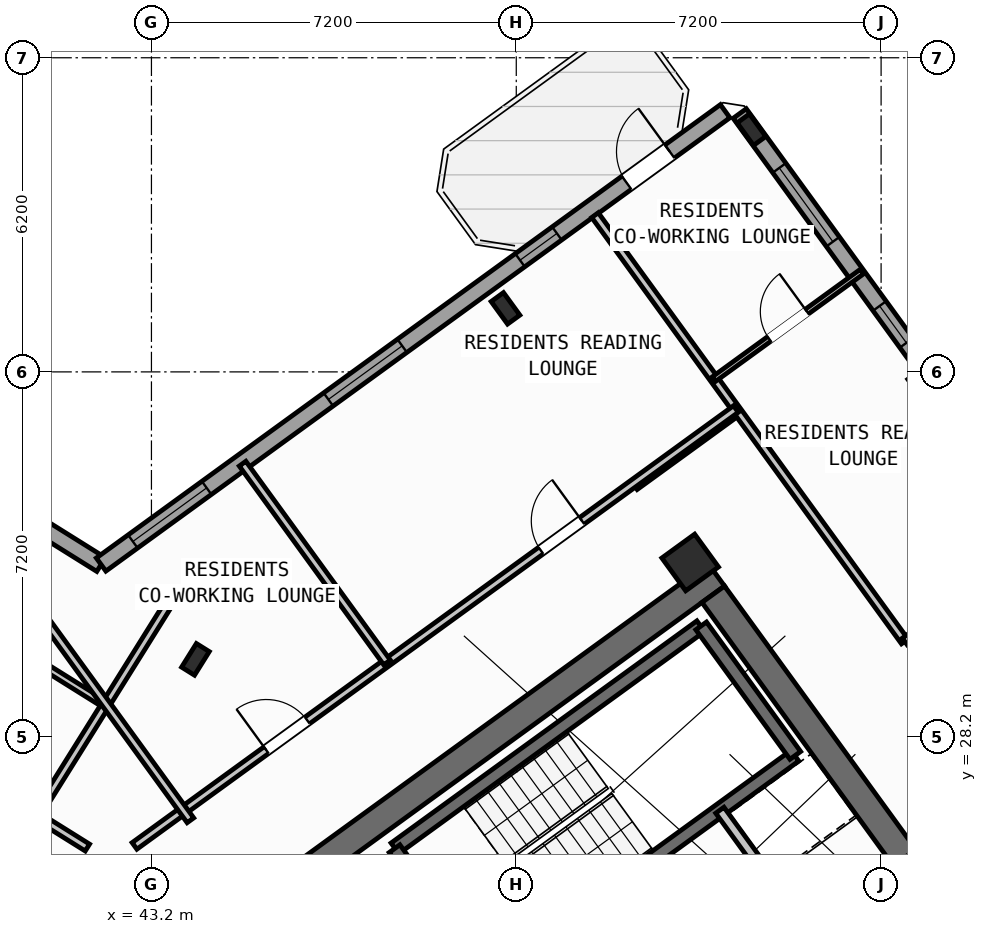
"""IFC4 building model, lengths in metres.
Left out: names, types, materials, properties, quantities, classifications, styles, units other than length and angle.
Written with IfcOpenShell. Run it as: python <this file> out.ifc"""

import sys

from ifc_helpers import new_model, si_unit, direction, frame, frame_2d, origin, origin_2d, place, context, subcontext, project, spatial, rectangle, hollow_rectangle, i_section, extrude, source, transform, mapped, element, fill, save


model = new_model("IFC4")
c1 = context("Model", 3, precision=1e-05, world=origin(), true_north=direction((0.0, 1.0)))
c2 = subcontext(c1, "Body", "Model", "MODEL_VIEW")
j1 = project(units=[si_unit("LENGTHUNIT", "METRE"), si_unit("PLANEANGLEUNIT", "RADIAN")], contexts=[c1])
p1 = place(None, origin())
s1 = spatial("IfcSite", under=j1, at=p1, CompositionType="ELEMENT")
p2 = place(p1, origin())
s2 = spatial("IfcBuilding", under=s1, at=p2, CompositionType="ELEMENT")
p3 = place(p2, frame((0.0, 0.0, 184.2)))
s3 = spatial("IfcBuildingStorey", under=s2, at=p3, CompositionType="ELEMENT", Elevation=184.2)
p4 = place(p3, frame((44.365, 24.142, 0.0), z_axis=(0.0, 0.0, 1.0), x_axis=(0.809024304885, 0.587775190107, 0.0)))
e1 = element("IfcWall", 1, at=p4, inside=s3, PredefinedType="SHEAR", context=c2, shape_type="SweptSolid", body=[
    extrude(rectangle(XDim=12.34, YDim=0.55, at=frame_2d((6.17, 0.0))), origin(), (0.0, 0.0, 1.0), 3.35),
])
p5 = place(p3, frame((58.064, 25.813, 0.0), z_axis=(0.0, 0.0, 1.0), x_axis=(-0.587764933797, 0.809031756236, 0.0)))
e2 = element("IfcWall", 2, at=p5, inside=s3, PredefinedType="SHEAR", context=c2, shape_type="SweptSolid", body=[
    extrude(rectangle(XDim=6.425, YDim=0.55, at=frame_2d((3.212, 0.0))), origin(), (0.0, 0.0, 1.0), 3.35),
])
m1 = source(origin(), c2, "Body", "SweptSolid", [
    extrude(i_section(OverallWidth=0.3, OverallDepth=0.55, WebThickness=0.015, FlangeThickness=0.029, at=origin_2d()), origin(), (0.0, 0.0, 1.0), 3.6),
])
p6 = place(p3, frame((44.068, 29.726, 0.0), z_axis=(0.0, 0.0, 1.0), x_axis=(-0.848048096156, 0.529919264233, 0.0)))
e3 = element("IfcColumn", 3, at=p6, inside=s3, PredefinedType="COLUMN", context=c2, shape_type="MappedRepresentation", body=[
    mapped(m1, transform((0.0, 0.0, 0.0), scale=1.0)),
])
m2 = source(origin(), c2, "Body", "SweptSolid", [
    extrude(hollow_rectangle(XDim=0.8, YDim=0.8, WallThickness=0.032, at=origin_2d()), origin(), (0.0, 0.0, 1.0), 3.6),
])
p7 = place(p3, frame((53.832, 31.638, 0.0), z_axis=(0.0, 0.0, 1.0), x_axis=(0.809016994375, 0.587785252292, 0.0)))
e4 = element("IfcColumn", 4, at=p7, inside=s3, PredefinedType="COLUMN", context=c2, shape_type="MappedRepresentation", body=[
    mapped(m2, transform((0.0, 0.0, 0.0), scale=1.0)),
])
for number, where, z_axis, x_axis in (
    (5, (50.188, 36.654, 0.0), (0.0, 0.0, 1.0), (0.809, 0.588, 0.0)),
    (6, (55.042, 40.181, 0.0), (0.0, 0.0, 1.0), (0.809, 0.588, 0.0)),
):
    element("IfcColumn", number, at=place(p3, frame(where, z_axis=z_axis, x_axis=x_axis)), inside=s3, PredefinedType="COLUMN", context=c2, shape_type="MappedRepresentation", body=[
        mapped(m1, transform((0.0, 0.0, 0.0), scale=1.0)),
    ])
p8 = place(p3, frame((17.424, 47.083, 0.0), z_axis=(0.0, 0.0, 1.0), x_axis=(0.848049927979, -0.529916332693, 0.0)))
e7 = element("IfcWall", 7, at=p8, inside=s3, PredefinedType="STANDARD", context=c2, shape_type="SweptSolid", body=[
    extrude(rectangle(XDim=29.223, YDim=0.32, at=frame_2d((14.612, 0.0))), origin(), (0.0, 0.0, 1.0), 3.35),
])
p9 = place(p8, frame((3.764, 0.0, 0.0)))
e8 = element("IfcOpeningElement", 8, at=p9, cuts=e7, PredefinedType="OPENING", context=c2, shape_type="SweptSolid", body=[
    extrude(rectangle(XDim=1.05, YDim=2.15, at=frame_2d((0.525, 1.075))), frame((0.0, 0.17, 0.0), z_axis=(0.0, -1.0, 0.0), x_axis=(1.0, 0.0, 0.0)), (0.0, 0.0, 1.0), 0.34),
])
p10 = place(p8, frame((8.344, 0.0, 0.8)))
e9 = element("IfcOpeningElement", 9, at=p10, cuts=e7, PredefinedType="OPENING", context=c2, shape_type="SweptSolid", body=[
    extrude(rectangle(XDim=2.1, YDim=1.55, at=frame_2d((1.05, 0.775))), frame((0.0, 0.17, 0.0), z_axis=(0.0, -1.0, 0.0), x_axis=(1.0, 0.0, 0.0)), (0.0, 0.0, 1.0), 0.34),
])
p11 = place(p8, frame((13.589, 0.0, 0.85)))
e10 = element("IfcOpeningElement", 10, at=p11, cuts=e7, PredefinedType="OPENING", context=c2, shape_type="SweptSolid", body=[
    extrude(rectangle(XDim=1.8, YDim=1.5, at=frame_2d((0.9, 0.75))), frame((0.0, 0.17, 0.0), z_axis=(0.0, -1.0, 0.0), x_axis=(1.0, 0.0, 0.0)), (0.0, 0.0, 1.0), 0.34),
])
p12 = place(p8, frame((17.104, 0.0, 0.95)))
e11 = element("IfcOpeningElement", 11, at=p12, cuts=e7, PredefinedType="OPENING", context=c2, shape_type="SweptSolid", body=[
    extrude(rectangle(XDim=1.2, YDim=1.4, at=frame_2d((0.6, 0.7))), frame((0.0, 0.17, 0.0), z_axis=(0.0, -1.0, 0.0), x_axis=(1.0, 0.0, 0.0)), (0.0, 0.0, 1.0), 0.34),
])
p13 = place(p8, frame((21.214, 0.0, 0.95)))
e12 = element("IfcOpeningElement", 12, at=p13, cuts=e7, PredefinedType="OPENING", context=c2, shape_type="SweptSolid", body=[
    extrude(rectangle(XDim=1.2, YDim=1.4, at=frame_2d((0.6, 0.7))), frame((0.0, 0.17, 0.0), z_axis=(0.0, -1.0, 0.0), x_axis=(1.0, 0.0, 0.0)), (0.0, 0.0, 1.0), 0.34),
])
p14 = place(p8, frame((25.853, 0.0, 0.95)))
e13 = element("IfcOpeningElement", 13, at=p14, cuts=e7, PredefinedType="OPENING", context=c2, shape_type="SweptSolid", body=[
    extrude(rectangle(XDim=1.2, YDim=1.4, at=frame_2d((0.6, 0.7))), frame((0.0, 0.17, 0.0), z_axis=(0.0, -1.0, 0.0), x_axis=(1.0, 0.0, 0.0)), (0.0, 0.0, 1.0), 0.34),
])
p15 = place(p3, frame((42.207, 31.597, 0.0), z_axis=(0.0, 0.0, 1.0), x_axis=(0.809020333377, 0.587780656523, 0.0)))
e14 = element("IfcWall", 14, at=p15, inside=s3, PredefinedType="STANDARD", context=c2, shape_type="SweptSolid", body=[
    extrude(rectangle(XDim=15.223, YDim=0.32, at=frame_2d((7.611, 0.0))), origin(), (0.0, 0.0, 1.0), 3.35),
])
p16 = place(p15, frame((12.82, 0.0, 0.0)))
e15 = element("IfcOpeningElement", 15, at=p16, cuts=e14, PredefinedType="OPENING", context=c2, shape_type="SweptSolid", body=[
    extrude(rectangle(XDim=1.05, YDim=2.15, at=frame_2d((0.525, 1.075))), frame((0.0, 0.17, 0.0), z_axis=(0.0, -1.0, 0.0), x_axis=(1.0, 0.0, 0.0)), (0.0, 0.0, 1.0), 0.34),
])
p17 = place(p15, frame((0.775, 0.0, 0.85)))
e16 = element("IfcOpeningElement", 16, at=p17, cuts=e14, PredefinedType="OPENING", context=c2, shape_type="SweptSolid", body=[
    extrude(rectangle(XDim=1.8, YDim=1.5, at=frame_2d((0.9, 0.75))), frame((0.0, 0.17, 0.0), z_axis=(0.0, -1.0, 0.0), x_axis=(1.0, 0.0, 0.0)), (0.0, 0.0, 1.0), 0.34),
])
p18 = place(p15, frame((5.544, 0.0, 0.85)))
e17 = element("IfcOpeningElement", 17, at=p18, cuts=e14, PredefinedType="OPENING", context=c2, shape_type="SweptSolid", body=[
    extrude(rectangle(XDim=1.8, YDim=1.5, at=frame_2d((0.9, 0.75))), frame((0.0, 0.17, 0.0), z_axis=(0.0, -1.0, 0.0), x_axis=(1.0, 0.0, 0.0)), (0.0, 0.0, 1.0), 0.34),
])
p19 = place(p15, frame((10.219, 0.0, 1.0)))
e18 = element("IfcOpeningElement", 18, at=p19, cuts=e14, PredefinedType="OPENING", context=c2, shape_type="SweptSolid", body=[
    extrude(rectangle(XDim=0.9, YDim=1.25, at=frame_2d((0.45, 0.625))), frame((0.0, 0.17, 0.0), z_axis=(0.0, -1.0, 0.0), x_axis=(1.0, 0.0, 0.0)), (0.0, 0.0, 1.0), 0.34),
])
p20 = place(p3, frame((54.81, 40.5, 0.0), z_axis=(0.0, 0.0, 1.0), x_axis=(0.587783625747, -0.809018176127, 0.0)))
e19 = element("IfcWall", 19, at=p20, inside=s3, PredefinedType="STANDARD", context=c2, shape_type="SweptSolid", body=[
    extrude(rectangle(XDim=21.587, YDim=0.32, at=frame_2d((10.794, 0.0))), origin(), (0.0, 0.0, 1.0), 2.825),
])
p21 = place(p20, frame((1.328, 0.0, 0.85)))
e20 = element("IfcOpeningElement", 20, at=p21, cuts=e19, PredefinedType="OPENING", context=c2, shape_type="SweptSolid", body=[
    extrude(rectangle(XDim=1.8, YDim=1.5, at=frame_2d((0.9, 0.75))), frame((0.0, 0.17, 0.0), z_axis=(0.0, -1.0, 0.0), x_axis=(1.0, 0.0, 0.0)), (0.0, 0.0, 1.0), 0.34),
])
p22 = place(p20, frame((4.695, 0.0, 1.0)))
e21 = element("IfcOpeningElement", 21, at=p22, cuts=e19, PredefinedType="OPENING", context=c2, shape_type="SweptSolid", body=[
    extrude(rectangle(XDim=0.9, YDim=1.25, at=frame_2d((0.45, 0.625))), frame((0.0, 0.17, 0.0), z_axis=(0.0, -1.0, 0.0), x_axis=(1.0, 0.0, 0.0)), (0.0, 0.0, 1.0), 0.34),
])
p23 = place(p20, frame((7.829, 0.0, 0.85)))
e22 = element("IfcOpeningElement", 22, at=p23, cuts=e19, PredefinedType="OPENING", context=c2, shape_type="SweptSolid", body=[
    extrude(rectangle(XDim=1.5, YDim=1.5, at=frame_2d((0.75, 0.75))), frame((0.0, 0.17, 0.0), z_axis=(0.0, -1.0, 0.0), x_axis=(1.0, 0.0, 0.0)), (0.0, 0.0, 1.0), 0.34),
])
p24 = place(p20, frame((15.542, 0.0, 0.95)))
e23 = element("IfcOpeningElement", 23, at=p24, cuts=e19, PredefinedType="OPENING", context=c2, shape_type="SweptSolid", body=[
    extrude(rectangle(XDim=1.2, YDim=1.4, at=frame_2d((0.6, 0.7))), frame((0.0, 0.17, 0.0), z_axis=(0.0, -1.0, 0.0), x_axis=(1.0, 0.0, 0.0)), (0.0, 0.0, 1.0), 0.34),
])
p25 = place(p20, frame((19.097, 0.0, 1.0)))
e24 = element("IfcOpeningElement", 24, at=p25, cuts=e19, PredefinedType="OPENING", context=c2, shape_type="SweptSolid", body=[
    extrude(rectangle(XDim=0.9, YDim=1.25, at=frame_2d((0.45, 0.625))), frame((0.0, 0.17, 0.0), z_axis=(0.0, -1.0, 0.0), x_axis=(1.0, 0.0, 0.0)), (0.0, 0.0, 1.0), 0.34),
])
p26 = place(p3, frame((48.006, 25.996, 0.0), z_axis=(0.0, 0.0, 1.0), x_axis=(0.80901903764, 0.587782439969, 0.0)))
e25 = element("IfcWall", 25, at=p26, inside=s3, PredefinedType="SHEAR", context=c2, shape_type="SweptSolid", body=[
    extrude(rectangle(XDim=7.46, YDim=0.26, at=frame_2d((3.73, 0.0))), origin(), (0.0, 0.0, 1.0), 3.35),
])
p27 = place(p3, frame((49.863, 23.44, 0.0), z_axis=(0.0, 0.0, 1.0), x_axis=(0.809003474932, 0.587803859759, 0.0)))
e26 = element("IfcWall", 26, at=p27, inside=s3, PredefinedType="SHEAR", context=c2, shape_type="SweptSolid", body=[
    extrude(rectangle(XDim=7.46, YDim=0.26, at=frame_2d((3.73, 0.0))), origin(), (0.0, 0.0, 1.0), 3.35),
])
p28 = place(p27, frame((0.36, 0.0, 0.0)))
e27 = element("IfcOpeningElement", 27, at=p28, cuts=e26, PredefinedType="OPENING", context=c2, shape_type="SweptSolid", body=[
    extrude(rectangle(XDim=0.86, YDim=2.05, at=frame_2d((0.43, 1.025))), frame((0.0, 0.14, 0.0), z_axis=(0.0, -1.0, 0.0), x_axis=(1.0, 0.0, 0.0)), (0.0, 0.0, 1.0), 0.28),
])
p29 = place(p3, frame((49.855, 23.434, 0.0), z_axis=(0.0, 0.0, 1.0), x_axis=(-0.58776738483, 0.809029975545, 0.0)))
e28 = element("IfcWall", 28, at=p29, inside=s3, PredefinedType="SHEAR", context=c2, shape_type="SweptSolid", body=[
    extrude(rectangle(XDim=3.16, YDim=0.26, at=frame_2d((1.58, 0.0))), origin(), (0.0, 0.0, 1.0), 3.35),
])
p30 = place(p3, frame((55.906, 27.831, 0.0), z_axis=(0.0, 0.0, 1.0), x_axis=(-0.587804123638, 0.809003283204, 0.0)))
e29 = element("IfcWall", 29, at=p30, inside=s3, PredefinedType="SHEAR", context=c2, shape_type="SweptSolid", body=[
    extrude(rectangle(XDim=3.16, YDim=0.26, at=frame_2d((1.58, 0.0))), origin(), (0.0, 0.0, 1.0), 3.35),
])
p31 = place(p3, frame((56.111, 24.419, 0.0), z_axis=(0.0, 0.0, 1.0), x_axis=(-0.58777848983, 0.809021907548, 0.0)))
e30 = element("IfcWall", 30, at=p31, inside=s3, PredefinedType="STANDARD", context=c2, shape_type="SweptSolid", body=[
    extrude(rectangle(XDim=2.88, YDim=0.2, at=frame_2d((1.44, 0.0))), origin(), (0.0, 0.0, 1.0), 3.34),
])
p32 = place(p3, frame((41.936, 26.012, 0.0), z_axis=(0.0, 0.0, 1.0), x_axis=(-0.848051154596, 0.529914369676, 0.0)))
e31 = element("IfcWall", 31, at=p32, inside=s3, PredefinedType="PARTITIONING", context=c2, shape_type="SweptSolid", body=[
    extrude(rectangle(XDim=15.57, YDim=0.16, at=frame_2d((7.785, 0.0))), origin(), (0.0, 0.0, 1.0), 3.34),
])
p33 = place(p32, frame((10.83, 0.0, 0.0)))
e32 = element("IfcOpeningElement", 32, at=p33, cuts=e31, PredefinedType="OPENING", context=c2, shape_type="SweptSolid", body=[
    extrude(rectangle(XDim=1.0, YDim=2.1, at=frame_2d((0.5, 1.05))), frame((0.0, 0.09, 0.0), z_axis=(0.0, -1.0, 0.0), x_axis=(1.0, 0.0, 0.0)), (0.0, 0.0, 1.0), 0.18),
])
p34 = place(p3, frame((43.704, 31.086, 0.0), z_axis=(0.0, 0.0, 1.0), x_axis=(-0.529906828443, -0.848055866774, 0.0)))
e33 = element("IfcWall", 33, at=p34, inside=s3, PredefinedType="PARTITIONING", context=c2, shape_type="SweptSolid", body=[
    extrude(rectangle(XDim=5.48, YDim=0.16, at=frame_2d((2.74, 0.0))), origin(), (0.0, 0.0, 1.0), 3.34),
])
p35 = place(p3, frame((42.226, 28.873, 0.0), z_axis=(0.0, 0.0, 1.0), x_axis=(-0.848049134363, 0.529917602752, 0.0)))
e34 = element("IfcWall", 34, at=p35, inside=s3, PredefinedType="PLUMBINGWALL", context=c2, shape_type="SweptSolid", body=[
    extrude(rectangle(XDim=14.3, YDim=0.14, at=frame_2d((7.15, 0.0))), origin(), (0.0, 0.0, 1.0), 3.34),
])
p36 = place(p35, frame((9.57, 0.0, 0.0)))
e35 = element("IfcOpeningElement", 35, at=p36, cuts=e34, PredefinedType="OPENING", context=c2, shape_type="SweptSolid", body=[
    extrude(rectangle(XDim=0.92, YDim=2.08, at=frame_2d((0.46, 1.04))), frame((0.0, 0.08, 0.0), z_axis=(0.0, -1.0, 0.0), x_axis=(1.0, 0.0, 0.0)), (0.0, 0.0, 1.0), 0.16),
])
p37 = place(p3, frame((52.739, 33.143, 0.0), z_axis=(0.0, 0.0, 1.0), x_axis=(0.809000999347, 0.58780726693, 0.0)))
e36 = element("IfcWall", 36, at=p37, inside=s3, PredefinedType="PARTITIONING", context=c2, shape_type="SweptSolid", body=[
    extrude(rectangle(XDim=2.51, YDim=0.16, at=frame_2d((1.255, 0.0))), origin(), (0.0, 0.0, 1.0), 3.34),
])
p38 = place(p3, frame((58.067, 30.08, 0.0), z_axis=(0.0, 0.0, 1.0), x_axis=(-0.587787785243, 0.809015154073, 0.0)))
e37 = element("IfcWall", 37, at=p38, inside=s3, PredefinedType="PARTITIONING", context=c2, shape_type="SweptSolid", body=[
    extrude(rectangle(XDim=10.4, YDim=0.16, at=frame_2d((5.2, 0.0))), origin(), (0.0, 0.0, 1.0), 3.34),
])
p39 = place(p3, frame((58.067, 30.08, 0.0), z_axis=(0.0, 0.0, 1.0), x_axis=(0.809012309495, 0.587791700422, 0.0)))
e38 = element("IfcWall", 38, at=p39, inside=s3, PredefinedType="PARTITIONING", context=c2, shape_type="SweptSolid", body=[
    extrude(rectangle(XDim=3.63, YDim=0.16, at=frame_2d((1.815, 0.0))), origin(), (0.0, 0.0, 1.0), 3.34),
])
p40 = place(p39, frame((1.305, 0.0, 0.0)))
e39 = element("IfcOpeningElement", 39, at=p40, cuts=e38, PredefinedType="OPENING", context=c2, shape_type="SweptSolid", body=[
    extrude(rectangle(XDim=1.0, YDim=2.1, at=frame_2d((0.5, 1.05))), frame((0.0, 0.09, 0.0), z_axis=(0.0, -1.0, 0.0), x_axis=(1.0, 0.0, 0.0)), (0.0, 0.0, 1.0), 0.18),
])
p41 = place(p3, frame((54.304, 35.259, 0.0), z_axis=(0.0, 0.0, 1.0), x_axis=(0.809005039917, 0.58780170584, 0.0)))
e40 = element("IfcWall", 40, at=p41, inside=s3, PredefinedType="PARTITIONING", context=c2, shape_type="SweptSolid", body=[
    extrude(rectangle(XDim=3.61, YDim=0.11, at=frame_2d((1.805, 0.0))), origin(), (0.0, 0.0, 1.0), 3.34),
])
p42 = place(p41, frame((1.345, 0.0, 0.0)))
e41 = element("IfcOpeningElement", 41, at=p42, cuts=e40, PredefinedType="OPENING", context=c2, shape_type="SweptSolid", body=[
    extrude(rectangle(XDim=0.92, YDim=2.08, at=frame_2d((0.46, 1.04))), frame((0.0, 0.065, 0.0), z_axis=(0.0, -1.0, 0.0), x_axis=(1.0, 0.0, 0.0)), (0.0, 0.0, 1.0), 0.13),
])
p43 = place(p3, frame((42.866, 26.044, 0.0), z_axis=(0.0, 0.0, 1.0), x_axis=(0.809020254154, 0.587780765566, 0.0)))
e42 = element("IfcWall", 42, at=p43, inside=s3, PredefinedType="PARTITIONING", context=c2, shape_type="SweptSolid", body=[
    extrude(rectangle(XDim=14.67, YDim=0.16, at=frame_2d((7.335, 0.0))), origin(), (0.0, 0.0, 1.0), 3.34),
])
p44 = place(p43, frame((3.215, 0.0, 0.0)))
e43 = element("IfcOpeningElement", 43, at=p44, cuts=e42, PredefinedType="OPENING", context=c2, shape_type="SweptSolid", body=[
    extrude(rectangle(XDim=1.0, YDim=2.1, at=frame_2d((0.5, 1.05))), frame((0.0, 0.09, 0.0), z_axis=(0.0, -1.0, 0.0), x_axis=(1.0, 0.0, 0.0)), (0.0, 0.0, 1.0), 0.18),
])
p45 = place(p43, frame((9.915, 0.0, 0.0)))
e44 = element("IfcOpeningElement", 44, at=p45, cuts=e42, PredefinedType="OPENING", context=c2, shape_type="SweptSolid", body=[
    extrude(rectangle(XDim=1.0, YDim=2.1, at=frame_2d((0.5, 1.05))), frame((0.0, 0.09, 0.0), z_axis=(0.0, -1.0, 0.0), x_axis=(1.0, 0.0, 0.0)), (0.0, 0.0, 1.0), 0.18),
])
p46 = place(p3, frame((43.969, 26.55, 0.0), z_axis=(0.0, 0.0, 1.0), x_axis=(-0.587776919386, 0.80902304852, 0.0)))
e45 = element("IfcWall", 45, at=p46, inside=s3, PredefinedType="PARTITIONING", context=c2, shape_type="SweptSolid", body=[
    extrude(rectangle(XDim=5.48, YDim=0.16, at=frame_2d((2.74, 0.0))), origin(), (0.0, 0.0, 1.0), 3.34),
])
p47 = place(p3, frame((47.849, 29.665, 0.0), z_axis=(0.0, 0.0, 1.0), x_axis=(-0.587785532001, 0.809016791155, 0.0)))
e46 = element("IfcWall", 46, at=p47, inside=s3, PredefinedType="PARTITIONING", context=c2, shape_type="SweptSolid", body=[
    extrude(rectangle(XDim=4.85, YDim=0.16, at=frame_2d((2.425, 0.0))), origin(), (0.0, 0.0, 1.0), 3.34),
])
m3 = source(origin(), c2, "Body", "SweptSolid", [
    extrude(rectangle(XDim=1.05, YDim=2.15, at=frame_2d((0.525, 1.075))), frame((0.0, 0.025, 0.0), z_axis=(0.0, -1.0, 0.0), x_axis=(1.0, 0.0, 0.0)), (0.0, 0.0, 1.0), 0.05),
])
p48 = place(p16, origin())
e47 = element("IfcDoor", 47, at=p48, inside=s3, OperationType="SINGLE_SWING_RIGHT", PredefinedType="DOOR", context=c2, shape_type="MappedRepresentation", body=[
    mapped(m3, transform((0.0, 0.0, 0.0), scale=1.0)),
])
fill(e15, e47)
m4 = source(origin(), c2, "Body", "SweptSolid", [
    extrude(rectangle(XDim=1.8, YDim=1.5, at=frame_2d((0.9, 0.75))), frame((0.0, 0.03, 0.0), z_axis=(0.0, -1.0, 0.0), x_axis=(1.0, 0.0, 0.0)), (0.0, 0.0, 1.0), 0.06),
])
p49 = place(p17, origin())
e48 = element("IfcWindow", 48, at=p49, inside=s3, PartitioningType="SINGLE_PANEL", PredefinedType="WINDOW", context=c2, shape_type="MappedRepresentation", body=[
    mapped(m4, transform((0.0, 0.0, 0.0), scale=1.0)),
])
fill(e16, e48)
p50 = place(p18, origin())
e49 = element("IfcWindow", 49, at=p50, inside=s3, PartitioningType="SINGLE_PANEL", PredefinedType="WINDOW", context=c2, shape_type="MappedRepresentation", body=[
    mapped(m4, transform((0.0, 0.0, 0.0), scale=1.0)),
])
fill(e17, e49)
m5 = source(origin(), c2, "Body", "SweptSolid", [
    extrude(rectangle(XDim=0.9, YDim=1.25, at=frame_2d((0.45, 0.625))), frame((0.0, 0.03, 0.0), z_axis=(0.0, -1.0, 0.0), x_axis=(1.0, 0.0, 0.0)), (0.0, 0.0, 1.0), 0.06),
])
p51 = place(p19, origin())
e50 = element("IfcWindow", 50, at=p51, inside=s3, PartitioningType="SINGLE_PANEL", PredefinedType="WINDOW", context=c2, shape_type="MappedRepresentation", body=[
    mapped(m5, transform((0.0, 0.0, 0.0), scale=1.0)),
])
fill(e18, e50)
p52 = place(p21, origin())
e51 = element("IfcWindow", 51, at=p52, inside=s3, PartitioningType="SINGLE_PANEL", PredefinedType="WINDOW", context=c2, shape_type="MappedRepresentation", body=[
    mapped(m4, transform((0.0, 0.0, 0.0), scale=1.0)),
])
fill(e20, e51)
p53 = place(p22, origin())
e52 = element("IfcWindow", 52, at=p53, inside=s3, PartitioningType="SINGLE_PANEL", PredefinedType="WINDOW", context=c2, shape_type="MappedRepresentation", body=[
    mapped(m5, transform((0.0, 0.0, 0.0), scale=1.0)),
])
fill(e21, e52)
m6 = source(origin(), c2, "Body", "SweptSolid", [
    extrude(rectangle(XDim=0.92, YDim=2.08, at=frame_2d((0.46, 1.04))), frame((0.0, 0.025, 0.0), z_axis=(0.0, -1.0, 0.0), x_axis=(1.0, 0.0, 0.0)), (0.0, 0.0, 1.0), 0.05),
])
p54 = place(p42, origin())
e53 = element("IfcDoor", 53, at=p54, inside=s3, OperationType="SINGLE_SWING_RIGHT", PredefinedType="DOOR", context=c2, shape_type="MappedRepresentation", body=[
    mapped(m6, transform((0.0, 0.0, 0.0), scale=1.0)),
])
fill(e41, e53)
m7 = source(origin(), c2, "Body", "SweptSolid", [
    extrude(rectangle(XDim=1.0, YDim=2.1, at=frame_2d((0.5, 1.05))), frame((0.0, 0.025, 0.0), z_axis=(0.0, -1.0, 0.0), x_axis=(1.0, 0.0, 0.0)), (0.0, 0.0, 1.0), 0.05),
])
p55 = place(p44, origin())
e54 = element("IfcDoor", 54, at=p55, inside=s3, OperationType="SINGLE_SWING_LEFT", PredefinedType="DOOR", context=c2, shape_type="MappedRepresentation", body=[
    mapped(m7, transform((0.0, 0.0, 0.0), scale=1.0)),
])
fill(e43, e54)
p56 = place(p45, origin())
e55 = element("IfcDoor", 55, at=p56, inside=s3, OperationType="SINGLE_SWING_RIGHT", PredefinedType="DOOR", context=c2, shape_type="MappedRepresentation", body=[
    mapped(m7, transform((0.0, 0.0, 0.0), scale=1.0)),
])
fill(e44, e55)
save(model, sys.argv[1])
